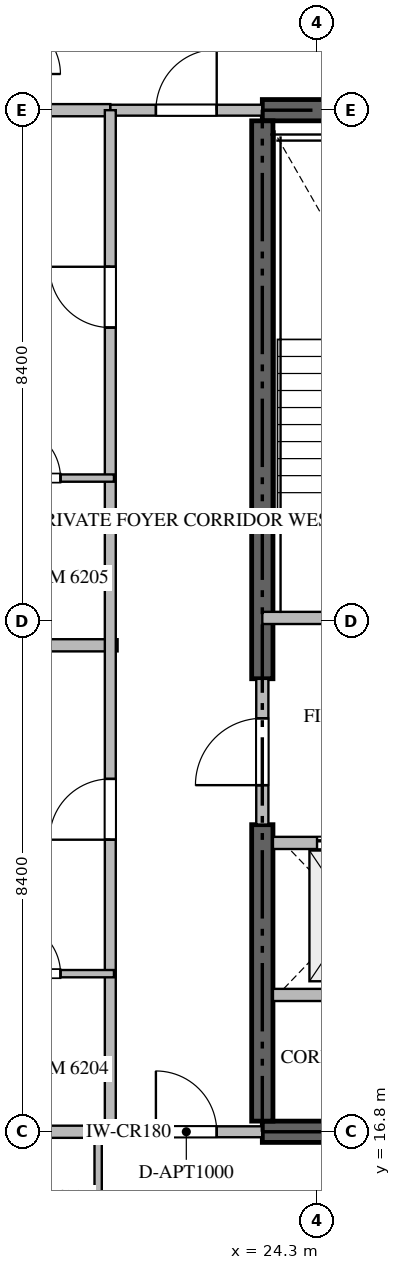
"""IFC4 building model, lengths in metres.
Left out: names, types, materials, properties, quantities, classifications, styles, units other than length and angle.
Written with IfcOpenShell. Run it as: python <this file> out.ifc"""

import sys

from ifc_helpers import new_model, si_unit, direction, frame, frame_2d, origin, place, context, subcontext, project, spatial, rectangle, extrude, source, transform, mapped, element, fill, save


model = new_model("IFC4")
c1 = context("Model", 3, precision=1e-05, world=origin(), true_north=direction((0.0, 1.0)))
c2 = subcontext(c1, "Body", "Model", "MODEL_VIEW")
j1 = project(units=[si_unit("LENGTHUNIT", "METRE"), si_unit("PLANEANGLEUNIT", "RADIAN")], contexts=[c1])
p1 = place(None, origin())
s1 = spatial("IfcSite", under=j1, at=p1, CompositionType="ELEMENT")
p2 = place(p1, origin())
s2 = spatial("IfcBuilding", under=s1, at=p2, CompositionType="ELEMENT")
p3 = place(p2, frame((0.0, 0.0, 248.95)))
s3 = spatial("IfcBuildingStorey", under=s2, at=p3, CompositionType="ELEMENT", Elevation=248.95)
for number, where, z_axis, x_axis in (
    (1, (23.4, 16.8, -0.26), (0.0, 0.0, 1.0), (1.0, 0.0, 0.0)),
    (2, (41.4, 33.6, -0.26), (0.0, 0.0, 1.0), (-1.0, 0.0, 0.0)),
):
    element("IfcWall", number, at=place(p3, frame(where, z_axis=z_axis, x_axis=x_axis)), inside=s3, PredefinedType="SHEAR", context=c2, shape_type="SweptSolid", body=[
        extrude(rectangle(XDim=18.0, YDim=0.35, at=frame_2d((9.0, 0.0))), origin(), (0.0, 0.0, 1.0), 3.848),
    ])
p4 = place(p3, frame((23.4, 16.975, -0.26), z_axis=(0.0, 0.0, 1.0), x_axis=(0.0, 1.0, 0.0)))
e3 = element("IfcWall", 3, at=p4, inside=s3, PredefinedType="SHEAR", context=c2, shape_type="SweptSolid", body=[
    extrude(rectangle(XDim=4.875, YDim=0.35, at=frame_2d((2.438, 0.0))), origin(), (0.0, 0.0, 1.0), 3.848),
])
p5 = place(p3, frame((23.4, 24.25, -0.26), z_axis=(0.0, 0.0, 1.0), x_axis=(0.0, 1.0, 0.0)))
e4 = element("IfcWall", 4, at=p5, inside=s3, PredefinedType="SHEAR", context=c2, shape_type="SweptSolid", body=[
    extrude(rectangle(XDim=9.175, YDim=0.35, at=frame_2d((4.587, 0.0))), origin(), (0.0, 0.0, 1.0), 3.848),
])
p6 = place(p3, frame((23.4, 25.25, 0.0), z_axis=(0.0, 0.0, 1.0), x_axis=(1.0, 0.0, 0.0)))
e5 = element("IfcWall", 5, at=p6, inside=s3, PredefinedType="STANDARD", context=c2, shape_type="SweptSolid", body=[
    extrude(rectangle(XDim=4.45, YDim=0.2, at=frame_2d((2.225, 0.0))), origin(), (0.0, 0.0, 1.0), 3.59),
])
p7 = place(p6, frame((1.65, 0.0, 0.0)))
e6 = element("IfcOpeningElement", 6, at=p7, cuts=e5, PredefinedType="OPENING", context=c2, shape_type="SweptSolid", body=[
    extrude(rectangle(XDim=1.1, YDim=2.15, at=frame_2d((0.55, 1.075))), frame((0.0, 0.11, 0.0), z_axis=(0.0, -1.0, 0.0), x_axis=(1.0, 0.0, 0.0)), (0.0, 0.0, 1.0), 0.22),
])
p8 = place(p3, frame((23.575, 21.55, 0.0), z_axis=(0.0, 0.0, 1.0), x_axis=(1.0, 0.0, 0.0)))
e7 = element("IfcWall", 7, at=p8, inside=s3, PredefinedType="STANDARD", context=c2, shape_type="SweptSolid", body=[
    extrude(rectangle(XDim=2.475, YDim=0.2, at=frame_2d((1.238, 0.0))), origin(), (0.0, 0.0, 1.0), 3.59),
])
p9 = place(p8, frame((0.725, 0.0, 0.0)))
e8 = element("IfcOpeningElement", 8, at=p9, cuts=e7, PredefinedType="OPENING", context=c2, shape_type="SweptSolid", body=[
    extrude(rectangle(XDim=1.2, YDim=2.2, at=frame_2d((0.6, 1.1))), frame((0.0, 0.11, 0.0), z_axis=(0.0, -1.0, 0.0), x_axis=(1.0, 0.0, 0.0)), (0.0, 0.0, 1.0), 0.22),
])
p10 = place(p3, frame((23.575, 19.05, 0.0), z_axis=(0.0, 0.0, 1.0), x_axis=(1.0, 0.0, 0.0)))
e9 = element("IfcWall", 9, at=p10, inside=s3, PredefinedType="STANDARD", context=c2, shape_type="SweptSolid", body=[
    extrude(rectangle(XDim=2.475, YDim=0.2, at=frame_2d((1.238, 0.0))), origin(), (0.0, 0.0, 1.0), 3.59),
])
p11 = place(p3, frame((23.4, 21.852, 0.0), z_axis=(0.0, 0.0, 1.0), x_axis=(0.0, 1.0, 0.0)))
e10 = element("IfcWall", 10, at=p11, inside=s3, PredefinedType="STANDARD", context=c2, shape_type="SweptSolid", body=[
    extrude(rectangle(XDim=2.396, YDim=0.2, at=frame_2d((1.198, 0.0))), origin(), (0.0, 0.0, 1.0), 3.59),
])
p12 = place(p11, frame((0.648, 0.0, 0.0)))
e11 = element("IfcOpeningElement", 11, at=p12, cuts=e10, PredefinedType="OPENING", context=c2, shape_type="SweptSolid", body=[
    extrude(rectangle(XDim=1.1, YDim=2.15, at=frame_2d((0.55, 1.075))), frame((0.0, 0.11, 0.0), z_axis=(0.0, -1.0, 0.0), x_axis=(1.0, 0.0, 0.0)), (0.0, 0.0, 1.0), 0.22),
])
p13 = place(p3, frame((7.482, 24.8, 0.0), z_axis=(0.0, 0.0, 1.0), x_axis=(1.0, 0.0, 0.0)))
e12 = element("IfcWall", 12, at=p13, inside=s3, PredefinedType="PARTITIONING", context=c2, shape_type="SweptSolid", body=[
    extrude(rectangle(XDim=13.538, YDim=0.2, at=frame_2d((6.769, 0.0))), origin(), (0.0, 0.0, 1.0), 3.59),
])
for number, where, z_axis, x_axis in (
    (13, (7.482, 16.8, 0.0), (0.0, 0.0, 1.0), (1.0, 0.0, 0.0)),
    (14, (7.482, 33.6, 0.0), (0.0, 0.0, 1.0), (1.0, 0.0, 0.0)),
):
    element("IfcWall", number, at=place(p3, frame(where, z_axis=z_axis, x_axis=x_axis)), inside=s3, PredefinedType="PARTITIONING", context=c2, shape_type="SweptSolid", body=[
        extrude(rectangle(XDim=13.418, YDim=0.2, at=frame_2d((6.709, 0.0))), origin(), (0.0, 0.0, 1.0), 3.59),
    ])
p14 = place(p3, frame((20.902, 16.8, 0.0), z_axis=(0.0, 0.0, 1.0), x_axis=(1.0, 0.0, 0.0)))
e15 = element("IfcWall", 15, at=p14, inside=s3, PredefinedType="PARTITIONING", context=c2, shape_type="SweptSolid", body=[
    extrude(rectangle(XDim=2.496, YDim=0.18, at=frame_2d((1.248, 0.0))), origin(), (0.0, 0.0, 1.0), 3.59),
])
p15 = place(p14, frame((0.748, 0.0, 0.0)))
e16 = element("IfcOpeningElement", 16, at=p15, cuts=e15, PredefinedType="OPENING", context=c2, shape_type="SweptSolid", body=[
    extrude(rectangle(XDim=1.0, YDim=2.15, at=frame_2d((0.5, 1.075))), frame((0.0, 0.1, 0.0), z_axis=(0.0, -1.0, 0.0), x_axis=(1.0, 0.0, 0.0)), (0.0, 0.0, 1.0), 0.2),
])
p16 = place(p3, frame((20.902, 33.6, 0.0), z_axis=(0.0, 0.0, 1.0), x_axis=(1.0, 0.0, 0.0)))
e17 = element("IfcWall", 17, at=p16, inside=s3, PredefinedType="PARTITIONING", context=c2, shape_type="SweptSolid", body=[
    extrude(rectangle(XDim=2.496, YDim=0.18, at=frame_2d((1.248, 0.0))), origin(), (0.0, 0.0, 1.0), 3.59),
])
p17 = place(p16, frame((0.748, 0.0, 0.0)))
e18 = element("IfcOpeningElement", 18, at=p17, cuts=e17, PredefinedType="OPENING", context=c2, shape_type="SweptSolid", body=[
    extrude(rectangle(XDim=1.0, YDim=2.15, at=frame_2d((0.5, 1.075))), frame((0.0, 0.1, 0.0), z_axis=(0.0, -1.0, 0.0), x_axis=(1.0, 0.0, 0.0)), (0.0, 0.0, 1.0), 0.2),
])
p18 = place(p3, frame((20.9, 16.8, 0.0), z_axis=(0.0, 0.0, 1.0), x_axis=(0.0, 1.0, 0.0)))
e19 = element("IfcWall", 19, at=p18, inside=s3, PredefinedType="PARTITIONING", context=c2, shape_type="SweptSolid", body=[
    extrude(rectangle(XDim=16.8, YDim=0.18, at=frame_2d((8.4, 0.0))), origin(), (0.0, 0.0, 1.0), 3.59),
])
p19 = place(p18, frame((4.803, 0.0, 0.0)))
e20 = element("IfcOpeningElement", 20, at=p19, cuts=e19, PredefinedType="OPENING", context=c2, shape_type="SweptSolid", body=[
    extrude(rectangle(XDim=1.0, YDim=2.15, at=frame_2d((0.5, 1.075))), frame((0.0, 0.1, 0.0), z_axis=(0.0, -1.0, 0.0), x_axis=(1.0, 0.0, 0.0)), (0.0, 0.0, 1.0), 0.2),
])
p20 = place(p18, frame((13.225, 0.0, 0.0)))
e21 = element("IfcOpeningElement", 21, at=p20, cuts=e19, PredefinedType="OPENING", context=c2, shape_type="SweptSolid", body=[
    extrude(rectangle(XDim=1.0, YDim=2.15, at=frame_2d((0.5, 1.075))), frame((0.0, 0.1, 0.0), z_axis=(0.0, -1.0, 0.0), x_axis=(1.0, 0.0, 0.0)), (0.0, 0.0, 1.0), 0.2),
])
p21 = place(p3, frame((20.7, 14.05, 0.0), z_axis=(0.0, 0.0, 1.0), x_axis=(0.0, 1.0, 0.0)))
e22 = element("IfcWall", 22, at=p21, inside=s3, PredefinedType="PARTITIONING", context=c2, shape_type="SweptSolid", body=[
    extrude(rectangle(XDim=2.81, YDim=0.12, at=frame_2d((1.405, 0.0))), origin(), (0.0, 0.0, 1.0), 3.59),
])
p22 = place(p3, frame((18.352, 19.4, 0.0), z_axis=(0.0, 0.0, 1.0), x_axis=(1.0, 0.0, 0.0)))
e23 = element("IfcWall", 23, at=p22, inside=s3, PredefinedType="PARTITIONING", context=c2, shape_type="SweptSolid", body=[
    extrude(rectangle(XDim=2.608, YDim=0.12, at=frame_2d((1.304, 0.0))), origin(), (0.0, 0.0, 1.0), 3.59),
])
p23 = place(p22, frame((0.879, 0.0, 0.0)))
e24 = element("IfcOpeningElement", 24, at=p23, cuts=e23, PredefinedType="OPENING", context=c2, shape_type="SweptSolid", body=[
    extrude(rectangle(XDim=0.85, YDim=2.1, at=frame_2d((0.425, 1.05))), frame((0.0, 0.07, 0.0), z_axis=(0.0, -1.0, 0.0), x_axis=(1.0, 0.0, 0.0)), (0.0, 0.0, 1.0), 0.14),
])
p24 = place(p3, frame((18.352, 27.55, 0.0), z_axis=(0.0, 0.0, 1.0), x_axis=(1.0, 0.0, 0.0)))
e25 = element("IfcWall", 25, at=p24, inside=s3, PredefinedType="PARTITIONING", context=c2, shape_type="SweptSolid", body=[
    extrude(rectangle(XDim=2.608, YDim=0.12, at=frame_2d((1.304, 0.0))), origin(), (0.0, 0.0, 1.0), 3.59),
])
p25 = place(p24, frame((0.879, 0.0, 0.0)))
e26 = element("IfcOpeningElement", 26, at=p25, cuts=e25, PredefinedType="OPENING", context=c2, shape_type="SweptSolid", body=[
    extrude(rectangle(XDim=0.85, YDim=2.1, at=frame_2d((0.425, 1.05))), frame((0.0, 0.07, 0.0), z_axis=(0.0, -1.0, 0.0), x_axis=(1.0, 0.0, 0.0)), (0.0, 0.0, 1.0), 0.14),
])
m1 = source(origin(), c2, "Body", "SweptSolid", [
    extrude(rectangle(XDim=1.2, YDim=2.2, at=frame_2d((0.6, 1.1))), frame((0.0, 0.025, 0.0), z_axis=(0.0, -1.0, 0.0), x_axis=(1.0, 0.0, 0.0)), (0.0, 0.0, 1.0), 0.05),
])
p26 = place(p9, origin())
e27 = element("IfcDoor", 27, at=p26, inside=s3, OperationType="DOUBLE_DOOR_SLIDING", PredefinedType="DOOR", context=c2, shape_type="MappedRepresentation", body=[
    mapped(m1, transform((0.0, 0.0, 0.0), scale=1.0)),
])
fill(e8, e27)
m2 = source(origin(), c2, "Body", "SweptSolid", [
    extrude(rectangle(XDim=1.1, YDim=2.15, at=frame_2d((0.55, 1.075))), frame((0.0, 0.025, 0.0), z_axis=(0.0, -1.0, 0.0), x_axis=(1.0, 0.0, 0.0)), (0.0, 0.0, 1.0), 0.05),
])
p27 = place(p12, origin())
e28 = element("IfcDoor", 28, at=p27, inside=s3, OperationType="SINGLE_SWING_LEFT", PredefinedType="DOOR", context=c2, shape_type="MappedRepresentation", body=[
    mapped(m2, transform((0.0, 0.0, 0.0), scale=1.0)),
])
fill(e11, e28)
m3 = source(origin(), c2, "Body", "SweptSolid", [
    extrude(rectangle(XDim=1.0, YDim=2.15, at=frame_2d((0.5, 1.075))), frame((0.0, 0.025, 0.0), z_axis=(0.0, -1.0, 0.0), x_axis=(1.0, 0.0, 0.0)), (0.0, 0.0, 1.0), 0.05),
])
p28 = place(p15, origin())
e29 = element("IfcDoor", 29, at=p28, inside=s3, OperationType="SINGLE_SWING_LEFT", PredefinedType="DOOR", context=c2, shape_type="MappedRepresentation", body=[
    mapped(m3, transform((0.0, 0.0, 0.0), scale=1.0)),
])
fill(e16, e29)
p29 = place(p17, origin())
e30 = element("IfcDoor", 30, at=p29, inside=s3, OperationType="SINGLE_SWING_RIGHT", PredefinedType="DOOR", context=c2, shape_type="MappedRepresentation", body=[
    mapped(m3, transform((0.0, 0.0, 0.0), scale=1.0)),
])
fill(e18, e30)
p30 = place(p19, origin())
e31 = element("IfcDoor", 31, at=p30, inside=s3, OperationType="SINGLE_SWING_LEFT", PredefinedType="DOOR", context=c2, shape_type="MappedRepresentation", body=[
    mapped(m3, transform((0.0, 0.0, 0.0), scale=1.0)),
])
fill(e20, e31)
p31 = place(p20, origin())
e32 = element("IfcDoor", 32, at=p31, inside=s3, OperationType="SINGLE_SWING_RIGHT", PredefinedType="DOOR", context=c2, shape_type="MappedRepresentation", body=[
    mapped(m3, transform((0.0, 0.0, 0.0), scale=1.0)),
])
fill(e21, e32)
m4 = source(origin(), c2, "Body", "SweptSolid", [
    extrude(rectangle(XDim=0.85, YDim=2.1, at=frame_2d((0.425, 1.05))), frame((0.0, 0.025, 0.0), z_axis=(0.0, -1.0, 0.0), x_axis=(1.0, 0.0, 0.0)), (0.0, 0.0, 1.0), 0.05),
])
p32 = place(p23, origin())
e33 = element("IfcDoor", 33, at=p32, inside=s3, OperationType="SINGLE_SWING_LEFT", PredefinedType="DOOR", context=c2, shape_type="MappedRepresentation", body=[
    mapped(m4, transform((0.0, 0.0, 0.0), scale=1.0)),
])
fill(e24, e33)
p33 = place(p25, origin())
e34 = element("IfcDoor", 34, at=p33, inside=s3, OperationType="SINGLE_SWING_LEFT", PredefinedType="DOOR", context=c2, shape_type="MappedRepresentation", body=[
    mapped(m4, transform((0.0, 0.0, 0.0), scale=1.0)),
])
fill(e26, e34)
save(model, sys.argv[1])
